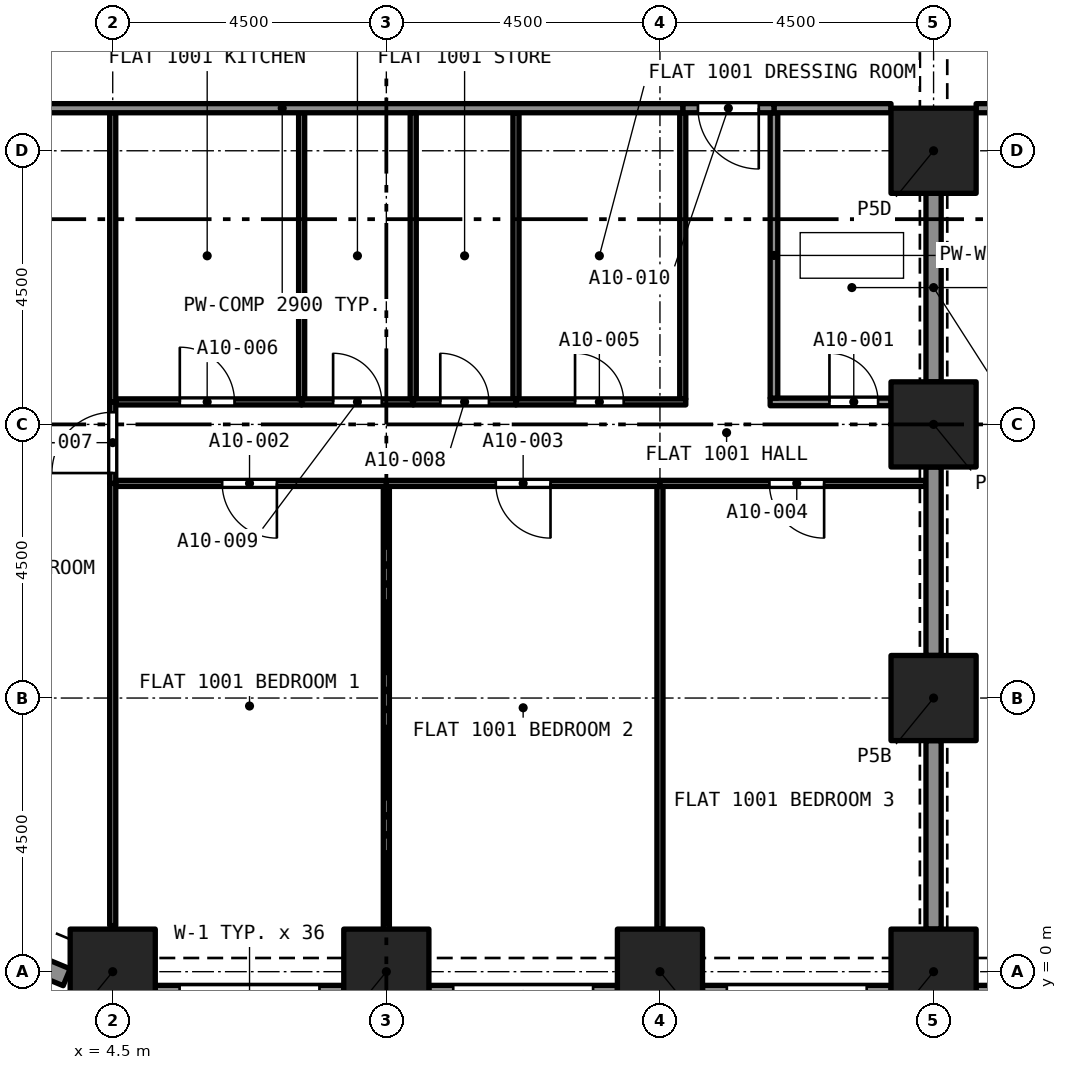
"""IFC4 building model, lengths in metres.
Left out: names, types, materials, properties, quantities, classifications, styles, units other than length and angle.
Written with IfcOpenShell. Run it as: python <this file> out.ifc"""

import sys

from ifc_helpers import new_model, si_unit, direction, frame, frame_2d, origin, origin_2d, place, context, subcontext, project, spatial, rectangle, extrude, element, fill, save


model = new_model("IFC4")
c1 = context("Model", 3, precision=1e-05, world=origin(), true_north=direction((0.0, 1.0)))
c2 = subcontext(c1, "Body", "Model", "MODEL_VIEW")
j1 = project(units=[si_unit("LENGTHUNIT", "METRE"), si_unit("PLANEANGLEUNIT", "RADIAN")], contexts=[c1])
p1 = place(None, origin())
s1 = spatial("IfcSite", under=j1, at=p1, CompositionType="ELEMENT")
p2 = place(p1, origin())
s2 = spatial("IfcBuilding", under=s1, at=p2, CompositionType="ELEMENT")
p3 = place(p2, frame((0.0, 0.0, 43.2)))
s3 = spatial("IfcBuildingStorey", under=s2, at=p3, CompositionType="ELEMENT", Elevation=43.2)
for number, where, z_axis, x_axis in (
    (1, (4.5, 0.0, 0.0), (0.0, 0.0, 1.0), (1.0, 0.0, 0.0)),
    (2, (9.0, 0.0, 0.0), (0.0, 0.0, 1.0), (1.0, 0.0, 0.0)),
    (3, (13.5, 0.0, 0.0), (0.0, 0.0, 1.0), (1.0, 0.0, 0.0)),
    (4, (18.0, 0.0, 0.0), (0.0, 0.0, 1.0), (1.0, 0.0, 0.0)),
    (5, (18.0, 4.5, 0.0), (0.0, 0.0, 1.0), (1.0, 0.0, 0.0)),
    (6, (18.0, 9.0, 0.0), (0.0, 0.0, 1.0), (1.0, 0.0, 0.0)),
    (7, (18.0, 13.5, 0.0), (0.0, 0.0, 1.0), (1.0, 0.0, 0.0)),
):
    element("IfcColumn", number, at=place(p3, frame(where, z_axis=z_axis, x_axis=x_axis)), inside=s3, PredefinedType="COLUMN", context=c2, shape_type="SweptSolid", body=[
        extrude(rectangle(XDim=1.4, YDim=1.4, at=origin_2d()), origin(), (0.0, 0.0, 1.0), 3.2),
    ])
p4 = place(p3, frame((3.743, -0.092, 0.0), z_axis=(0.0, 0.0, 1.0), x_axis=(-0.923857286003, 0.382737135771, 0.0)))
e8 = element("IfcWall", 8, at=p4, inside=s3, PredefinedType="SOLIDWALL", context=c2, shape_type="SweptSolid", body=[
    extrude(rectangle(XDim=1.865, YDim=0.3, at=frame_2d((0.933, 0.0))), origin(), (0.0, 0.0, 1.0), 3.2),
])
p5 = place(p4, frame((0.508, 0.0, 0.45)))
e9 = element("IfcOpeningElement", 9, at=p5, cuts=e8, PredefinedType="OPENING", context=c2, shape_type="SweptSolid", body=[
    extrude(rectangle(XDim=1.1, YDim=1.95, at=frame_2d((0.55, 0.975))), frame((0.0, 0.16, 0.0), z_axis=(0.0, -1.0, 0.0), x_axis=(1.0, 0.0, 0.0)), (0.0, 0.0, 1.0), 0.32),
])
p6 = place(p3, frame((8.3, -0.375, 0.0), z_axis=(0.0, 0.0, 1.0), x_axis=(-1.0, 0.0, 0.0)))
e10 = element("IfcWall", 10, at=p6, inside=s3, PredefinedType="SOLIDWALL", context=c2, shape_type="SweptSolid", body=[
    extrude(rectangle(XDim=3.1, YDim=0.3, at=frame_2d((1.55, 0.0))), origin(), (0.0, 0.0, 1.0), 3.2),
])
p7 = place(p6, frame((0.4, 0.0, 0.45)))
e11 = element("IfcOpeningElement", 11, at=p7, cuts=e10, PredefinedType="OPENING", context=c2, shape_type="SweptSolid", body=[
    extrude(rectangle(XDim=2.3, YDim=1.95, at=frame_2d((1.15, 0.975))), frame((0.0, 0.16, 0.0), z_axis=(0.0, -1.0, 0.0), x_axis=(1.0, 0.0, 0.0)), (0.0, 0.0, 1.0), 0.32),
])
p8 = place(p3, frame((12.8, -0.375, 0.0), z_axis=(0.0, 0.0, 1.0), x_axis=(-1.0, 0.0, 0.0)))
e12 = element("IfcWall", 12, at=p8, inside=s3, PredefinedType="SOLIDWALL", context=c2, shape_type="SweptSolid", body=[
    extrude(rectangle(XDim=3.1, YDim=0.3, at=frame_2d((1.55, 0.0))), origin(), (0.0, 0.0, 1.0), 3.2),
])
p9 = place(p8, frame((0.4, 0.0, 0.45)))
e13 = element("IfcOpeningElement", 13, at=p9, cuts=e12, PredefinedType="OPENING", context=c2, shape_type="SweptSolid", body=[
    extrude(rectangle(XDim=2.3, YDim=1.95, at=frame_2d((1.15, 0.975))), frame((0.0, 0.16, 0.0), z_axis=(0.0, -1.0, 0.0), x_axis=(1.0, 0.0, 0.0)), (0.0, 0.0, 1.0), 0.32),
])
p10 = place(p3, frame((17.3, -0.375, 0.0), z_axis=(0.0, 0.0, 1.0), x_axis=(-1.0, 0.0, 0.0)))
e14 = element("IfcWall", 14, at=p10, inside=s3, PredefinedType="SOLIDWALL", context=c2, shape_type="SweptSolid", body=[
    extrude(rectangle(XDim=3.1, YDim=0.3, at=frame_2d((1.55, 0.0))), origin(), (0.0, 0.0, 1.0), 3.2),
])
p11 = place(p10, frame((0.4, 0.0, 0.45)))
e15 = element("IfcOpeningElement", 15, at=p11, cuts=e14, PredefinedType="OPENING", context=c2, shape_type="SweptSolid", body=[
    extrude(rectangle(XDim=2.3, YDim=1.95, at=frame_2d((1.15, 0.975))), frame((0.0, 0.16, 0.0), z_axis=(0.0, -1.0, 0.0), x_axis=(1.0, 0.0, 0.0)), (0.0, 0.0, 1.0), 0.32),
])
p12 = place(p3, frame((21.8, -0.375, 0.0), z_axis=(0.0, 0.0, 1.0), x_axis=(-1.0, 0.0, 0.0)))
e16 = element("IfcWall", 16, at=p12, inside=s3, PredefinedType="SOLIDWALL", context=c2, shape_type="SweptSolid", body=[
    extrude(rectangle(XDim=3.1, YDim=0.3, at=frame_2d((1.55, 0.0))), origin(), (0.0, 0.0, 1.0), 3.2),
])
p13 = place(p12, frame((0.4, 0.0, 0.45)))
e17 = element("IfcOpeningElement", 17, at=p13, cuts=e16, PredefinedType="OPENING", context=c2, shape_type="SweptSolid", body=[
    extrude(rectangle(XDim=2.3, YDim=1.95, at=frame_2d((1.15, 0.975))), frame((0.0, 0.16, 0.0), z_axis=(0.0, -1.0, 0.0), x_axis=(1.0, 0.0, 0.0)), (0.0, 0.0, 1.0), 0.32),
])
p14 = place(p3, frame((15.312, 9.37, 0.0), z_axis=(0.0, 0.0, 1.0), x_axis=(1.0, 0.0, 0.0)))
e18 = element("IfcWall", 18, at=p14, inside=s3, PredefinedType="PARTITIONING", context=c2, shape_type="SweptSolid", body=[
    extrude(rectangle(XDim=1.988, YDim=0.125, at=frame_2d((0.994, 0.0))), origin(), (0.0, 0.0, 1.0), 2.9),
])
p15 = place(p14, frame((0.975, 0.0, 0.0)))
e19 = element("IfcOpeningElement", 19, at=p15, cuts=e18, PredefinedType="OPENING", context=c2, shape_type="SweptSolid", body=[
    extrude(rectangle(XDim=0.8, YDim=2.1, at=frame_2d((0.4, 1.05))), frame((0.0, 0.073, 0.0), z_axis=(0.0, -1.0, 0.0), x_axis=(1.0, 0.0, 0.0)), (0.0, 0.0, 1.0), 0.145),
])
p16 = place(p3, frame((15.375, 9.433, 0.0), z_axis=(0.0, 0.0, 1.0), x_axis=(0.0, 1.0, 0.0)))
e20 = element("IfcWall", 20, at=p16, inside=s3, PredefinedType="PARTITIONING", context=c2, shape_type="SweptSolid", body=[
    extrude(rectangle(XDim=4.692, YDim=0.125, at=frame_2d((2.346, 0.0))), origin(), (0.0, 0.0, 1.0), 2.9),
])
p17 = place(p3, frame((18.0, 9.7, 0.0), z_axis=(0.0, 0.0, 1.0), x_axis=(0.0, 1.0, 0.0)))
e21 = element("IfcWall", 21, at=p17, inside=s3, PredefinedType="PARTITIONING", context=c2, shape_type="SweptSolid", body=[
    extrude(rectangle(XDim=3.1, YDim=0.25, at=frame_2d((1.55, 0.0))), origin(), (0.0, 0.0, 1.0), 2.38),
])
p18 = place(p3, frame((15.375, 14.2, 0.0), z_axis=(0.0, 0.0, 1.0), x_axis=(1.0, 0.0, 0.0)))
e22 = element("IfcWall", 22, at=p18, inside=s3, PredefinedType="PARTITIONING", context=c2, shape_type="SweptSolid", body=[
    extrude(rectangle(XDim=1.925, YDim=0.15, at=frame_2d((0.962, 0.0))), origin(), (0.0, 0.0, 1.0), 2.9),
])
p19 = place(p3, frame((9.0, 0.7, 0.0), z_axis=(0.0, 0.0, 1.0), x_axis=(0.0, 1.0, 0.0)))
e23 = element("IfcWall", 23, at=p19, inside=s3, PredefinedType="PARTITIONING", context=c2, shape_type="SweptSolid", body=[
    extrude(rectangle(XDim=7.28, YDim=0.1, at=frame_2d((3.64, 0.0))), origin(), (0.0, 0.0, 1.0), 2.9),
])
p20 = place(p3, frame((9.0, 8.03, 0.0), z_axis=(0.0, 0.0, 1.0), x_axis=(-1.0, 0.0, 0.0)))
e24 = element("IfcWall", 24, at=p20, inside=s3, PredefinedType="PARTITIONING", context=c2, shape_type="SweptSolid", body=[
    extrude(rectangle(XDim=4.45, YDim=0.1, at=frame_2d((2.225, 0.0))), origin(), (0.0, 0.0, 1.0), 2.9),
])
p21 = place(p20, frame((1.8, 0.0, 0.0)))
e25 = element("IfcOpeningElement", 25, at=p21, cuts=e24, PredefinedType="OPENING", context=c2, shape_type="SweptSolid", body=[
    extrude(rectangle(XDim=0.9, YDim=2.1, at=frame_2d((0.45, 1.05))), frame((0.0, 0.06, 0.0), z_axis=(0.0, -1.0, 0.0), x_axis=(1.0, 0.0, 0.0)), (0.0, 0.0, 1.0), 0.12),
])
p22 = place(p3, frame((4.5, 0.758, 0.0), z_axis=(0.0, 0.0, 1.0), x_axis=(0.0, 1.0, 0.0)))
e26 = element("IfcWall", 26, at=p22, inside=s3, PredefinedType="PARTITIONING", context=c2, shape_type="SweptSolid", body=[
    extrude(rectangle(XDim=7.272, YDim=0.1, at=frame_2d((3.636, 0.0))), origin(), (0.0, 0.0, 1.0), 2.9),
])
p23 = place(p3, frame((13.5, 0.7, 0.0), z_axis=(0.0, 0.0, 1.0), x_axis=(0.0, 1.0, 0.0)))
e27 = element("IfcWall", 27, at=p23, inside=s3, PredefinedType="PARTITIONING", context=c2, shape_type="SweptSolid", body=[
    extrude(rectangle(XDim=7.28, YDim=0.1, at=frame_2d((3.64, 0.0))), origin(), (0.0, 0.0, 1.0), 2.9),
])
p24 = place(p3, frame((13.5, 8.03, 0.0), z_axis=(0.0, 0.0, 1.0), x_axis=(-1.0, 0.0, 0.0)))
e28 = element("IfcWall", 28, at=p24, inside=s3, PredefinedType="PARTITIONING", context=c2, shape_type="SweptSolid", body=[
    extrude(rectangle(XDim=4.5, YDim=0.1, at=frame_2d((2.25, 0.0))), origin(), (0.0, 0.0, 1.0), 2.9),
])
p25 = place(p24, frame((1.8, 0.0, 0.0)))
e29 = element("IfcOpeningElement", 29, at=p25, cuts=e28, PredefinedType="OPENING", context=c2, shape_type="SweptSolid", body=[
    extrude(rectangle(XDim=0.9, YDim=2.1, at=frame_2d((0.45, 1.05))), frame((0.0, 0.06, 0.0), z_axis=(0.0, -1.0, 0.0), x_axis=(1.0, 0.0, 0.0)), (0.0, 0.0, 1.0), 0.12),
])
p26 = place(p3, frame((17.875, 8.03, 0.0), z_axis=(0.0, 0.0, 1.0), x_axis=(-1.0, 0.0, 0.0)))
e30 = element("IfcWall", 30, at=p26, inside=s3, PredefinedType="PARTITIONING", context=c2, shape_type="SweptSolid", body=[
    extrude(rectangle(XDim=4.375, YDim=0.1, at=frame_2d((2.188, 0.0))), origin(), (0.0, 0.0, 1.0), 2.9),
])
p27 = place(p26, frame((1.675, 0.0, 0.0)))
e31 = element("IfcOpeningElement", 31, at=p27, cuts=e30, PredefinedType="OPENING", context=c2, shape_type="SweptSolid", body=[
    extrude(rectangle(XDim=0.9, YDim=2.1, at=frame_2d((0.45, 1.05))), frame((0.0, 0.06, 0.0), z_axis=(0.0, -1.0, 0.0), x_axis=(1.0, 0.0, 0.0)), (0.0, 0.0, 1.0), 0.12),
])
for number, where, z_axis, x_axis in (
    (32, (18.0, 5.2, 0.0), (0.0, 0.0, 1.0), (0.0, 1.0, 0.0)),
    (33, (18.0, 0.7, 0.0), (0.0, 0.0, 1.0), (0.0, 1.0, 0.0)),
):
    element("IfcWall", number, at=place(p3, frame(where, z_axis=z_axis, x_axis=x_axis)), inside=s3, PredefinedType="PARTITIONING", context=c2, shape_type="SweptSolid", body=[
        extrude(rectangle(XDim=3.1, YDim=0.25, at=frame_2d((1.55, 0.0))), origin(), (0.0, 0.0, 1.0), 2.38),
    ])
p28 = place(p3, frame((13.875, 9.42, 0.0), z_axis=(0.0, 0.0, 1.0), x_axis=(0.0, 1.0, 0.0)))
e34 = element("IfcWall", 34, at=p28, inside=s3, PredefinedType="PARTITIONING", context=c2, shape_type="SweptSolid", body=[
    extrude(rectangle(XDim=4.705, YDim=0.1, at=frame_2d((2.353, 0.0))), origin(), (0.0, 0.0, 1.0), 2.9),
])
p29 = place(p3, frame((11.132, 9.37, 0.0), z_axis=(0.0, 0.0, 1.0), x_axis=(1.0, 0.0, 0.0)))
e35 = element("IfcWall", 35, at=p29, inside=s3, PredefinedType="PARTITIONING", context=c2, shape_type="SweptSolid", body=[
    extrude(rectangle(XDim=2.793, YDim=0.1, at=frame_2d((1.396, 0.0))), origin(), (0.0, 0.0, 1.0), 2.9),
])
p30 = place(p29, frame((0.972, 0.0, 0.0)))
e36 = element("IfcOpeningElement", 36, at=p30, cuts=e35, PredefinedType="OPENING", context=c2, shape_type="SweptSolid", body=[
    extrude(rectangle(XDim=0.8, YDim=2.1, at=frame_2d((0.4, 1.05))), frame((0.0, 0.06, 0.0), z_axis=(0.0, -1.0, 0.0), x_axis=(1.0, 0.0, 0.0)), (0.0, 0.0, 1.0), 0.12),
])
p31 = place(p3, frame((11.132, 9.42, 0.0), z_axis=(0.0, 0.0, 1.0), x_axis=(0.0, 1.0, 0.0)))
e37 = element("IfcWall", 37, at=p31, inside=s3, PredefinedType="PARTITIONING", context=c2, shape_type="SweptSolid", body=[
    extrude(rectangle(XDim=4.705, YDim=0.1, at=frame_2d((2.353, 0.0))), origin(), (0.0, 0.0, 1.0), 2.9),
])
p32 = place(p3, frame((4.55, 9.37, 0.0), z_axis=(0.0, 0.0, 1.0), x_axis=(1.0, 0.0, 0.0)))
e38 = element("IfcWall", 38, at=p32, inside=s3, PredefinedType="PARTITIONING", context=c2, shape_type="SweptSolid", body=[
    extrude(rectangle(XDim=3.057, YDim=0.1, at=frame_2d((1.528, 0.0))), origin(), (0.0, 0.0, 1.0), 2.9),
])
p33 = place(p32, frame((1.053, 0.0, 0.0)))
e39 = element("IfcOpeningElement", 39, at=p33, cuts=e38, PredefinedType="OPENING", context=c2, shape_type="SweptSolid", body=[
    extrude(rectangle(XDim=0.9, YDim=2.1, at=frame_2d((0.45, 1.05))), frame((0.0, 0.06, 0.0), z_axis=(0.0, -1.0, 0.0), x_axis=(1.0, 0.0, 0.0)), (0.0, 0.0, 1.0), 0.12),
])
p34 = place(p3, frame((4.5, 8.03, 0.0), z_axis=(0.0, 0.0, 1.0), x_axis=(0.0, 1.0, 0.0)))
e40 = element("IfcWall", 40, at=p34, inside=s3, PredefinedType="PARTITIONING", context=c2, shape_type="SweptSolid", body=[
    extrude(rectangle(XDim=1.34, YDim=0.1, at=frame_2d((0.67, 0.0))), origin(), (0.0, 0.0, 1.0), 2.9),
])
p35 = place(p34, frame((0.17, 0.0, 0.0)))
e41 = element("IfcOpeningElement", 41, at=p35, cuts=e40, PredefinedType="OPENING", context=c2, shape_type="SweptSolid", body=[
    extrude(rectangle(XDim=1.0, YDim=2.1, at=frame_2d((0.5, 1.05))), frame((0.0, 0.06, 0.0), z_axis=(0.0, -1.0, 0.0), x_axis=(1.0, 0.0, 0.0)), (0.0, 0.0, 1.0), 0.12),
])
p36 = place(p3, frame((9.442, 9.37, 0.0), z_axis=(0.0, 0.0, 1.0), x_axis=(1.0, 0.0, 0.0)))
e42 = element("IfcWall", 42, at=p36, inside=s3, PredefinedType="PARTITIONING", context=c2, shape_type="SweptSolid", body=[
    extrude(rectangle(XDim=1.689, YDim=0.1, at=frame_2d((0.845, 0.0))), origin(), (0.0, 0.0, 1.0), 2.9),
])
p37 = place(p36, frame((0.445, 0.0, 0.0)))
e43 = element("IfcOpeningElement", 43, at=p37, cuts=e42, PredefinedType="OPENING", context=c2, shape_type="SweptSolid", body=[
    extrude(rectangle(XDim=0.8, YDim=2.1, at=frame_2d((0.4, 1.05))), frame((0.0, 0.06, 0.0), z_axis=(0.0, -1.0, 0.0), x_axis=(1.0, 0.0, 0.0)), (0.0, 0.0, 1.0), 0.12),
])
p38 = place(p3, frame((7.607, 9.37, 0.0), z_axis=(0.0, 0.0, 1.0), x_axis=(1.0, 0.0, 0.0)))
e44 = element("IfcWall", 44, at=p38, inside=s3, PredefinedType="PARTITIONING", context=c2, shape_type="SweptSolid", body=[
    extrude(rectangle(XDim=1.836, YDim=0.1, at=frame_2d((0.918, 0.0))), origin(), (0.0, 0.0, 1.0), 2.9),
])
p39 = place(p38, frame((0.518, 0.0, 0.0)))
e45 = element("IfcOpeningElement", 45, at=p39, cuts=e44, PredefinedType="OPENING", context=c2, shape_type="SweptSolid", body=[
    extrude(rectangle(XDim=0.8, YDim=2.1, at=frame_2d((0.4, 1.05))), frame((0.0, 0.06, 0.0), z_axis=(0.0, -1.0, 0.0), x_axis=(1.0, 0.0, 0.0)), (0.0, 0.0, 1.0), 0.12),
])
p40 = place(p3, frame((15.375, 14.2, 0.0), z_axis=(0.0, 0.0, 1.0), x_axis=(-1.0, 0.0, 0.0)))
e46 = element("IfcWall", 46, at=p40, inside=s3, PredefinedType="PARTITIONING", context=c2, shape_type="SweptSolid", body=[
    extrude(rectangle(XDim=1.5, YDim=0.15, at=frame_2d((0.75, 0.0))), origin(), (0.0, 0.0, 1.0), 2.9),
])
p41 = place(p40, frame((0.25, 0.0, 0.0)))
e47 = element("IfcOpeningElement", 47, at=p41, cuts=e46, PredefinedType="OPENING", context=c2, shape_type="SweptSolid", body=[
    extrude(rectangle(XDim=1.0, YDim=2.1, at=frame_2d((0.5, 1.05))), frame((0.0, 0.085, 0.0), z_axis=(0.0, -1.0, 0.0), x_axis=(1.0, 0.0, 0.0)), (0.0, 0.0, 1.0), 0.17),
])
p42 = place(p3, frame((4.5, 9.37, 0.0), z_axis=(0.0, 0.0, 1.0), x_axis=(0.0, 1.0, 0.0)))
e48 = element("IfcWall", 48, at=p42, inside=s3, PredefinedType="PARTITIONING", context=c2, shape_type="SweptSolid", body=[
    extrude(rectangle(XDim=4.755, YDim=0.1, at=frame_2d((2.377, 0.0))), origin(), (0.0, 0.0, 1.0), 2.9),
])
p43 = place(p3, frame((7.607, 9.42, 0.0), z_axis=(0.0, 0.0, 1.0), x_axis=(0.0, 1.0, 0.0)))
e49 = element("IfcWall", 49, at=p43, inside=s3, PredefinedType="PARTITIONING", context=c2, shape_type="SweptSolid", body=[
    extrude(rectangle(XDim=4.705, YDim=0.1, at=frame_2d((2.353, 0.0))), origin(), (0.0, 0.0, 1.0), 2.9),
])
p44 = place(p3, frame((0.7, 14.2, 0.0), z_axis=(0.0, 0.0, 1.0), x_axis=(1.0, 0.0, 0.0)))
e50 = element("IfcWall", 50, at=p44, inside=s3, PredefinedType="PARTITIONING", context=c2, shape_type="SweptSolid", body=[
    extrude(rectangle(XDim=13.175, YDim=0.15, at=frame_2d((6.587, 0.0))), origin(), (0.0, 0.0, 1.0), 2.9),
])
p45 = place(p3, frame((9.442, 9.42, 0.0), z_axis=(0.0, 0.0, 1.0), x_axis=(0.0, 1.0, 0.0)))
e51 = element("IfcWall", 51, at=p45, inside=s3, PredefinedType="PARTITIONING", context=c2, shape_type="SweptSolid", body=[
    extrude(rectangle(XDim=4.705, YDim=0.1, at=frame_2d((2.353, 0.0))), origin(), (0.0, 0.0, 1.0), 2.9),
])
p46 = place(p3, frame((27.0, 14.2, 0.0), z_axis=(0.0, 0.0, 1.0), x_axis=(-1.0, 0.0, 0.0)))
e52 = element("IfcWall", 52, at=p46, inside=s3, PredefinedType="PARTITIONING", context=c2, shape_type="SweptSolid", body=[
    extrude(rectangle(XDim=8.3, YDim=0.15, at=frame_2d((4.15, 0.0))), origin(), (0.0, 0.0, 1.0), 2.75),
])
p47 = place(p46, frame((4.0, 0.0, 0.0)))
e53 = element("IfcOpeningElement", 53, at=p47, cuts=e52, PredefinedType="OPENING", context=c2, shape_type="SweptSolid", body=[
    extrude(rectangle(XDim=1.0, YDim=2.1, at=frame_2d((0.5, 1.05))), frame((0.0, 0.085, 0.0), z_axis=(0.0, -1.0, 0.0), x_axis=(1.0, 0.0, 0.0)), (0.0, 0.0, 1.0), 0.17),
])
p48 = place(p15, origin())
e54 = element("IfcDoor", 54, at=p48, inside=s3, OperationType="SINGLE_SWING_RIGHT", PredefinedType="DOOR", context=c2, shape_type="SweptSolid", body=[
    extrude(rectangle(XDim=0.8, YDim=2.1, at=frame_2d((0.4, 1.05))), frame((0.0, 0.025, 0.0), z_axis=(0.0, -1.0, 0.0), x_axis=(1.0, 0.0, 0.0)), (0.0, 0.0, 1.0), 0.05),
])
fill(e19, e54)
p49 = place(p21, origin())
e55 = element("IfcDoor", 55, at=p49, inside=s3, OperationType="SINGLE_SWING_RIGHT", PredefinedType="DOOR", context=c2, shape_type="SweptSolid", body=[
    extrude(rectangle(XDim=0.9, YDim=2.1, at=frame_2d((0.45, 1.05))), frame((0.0, 0.025, 0.0), z_axis=(0.0, -1.0, 0.0), x_axis=(1.0, 0.0, 0.0)), (0.0, 0.0, 1.0), 0.05),
])
fill(e25, e55)
p50 = place(p25, origin())
e56 = element("IfcDoor", 56, at=p50, inside=s3, OperationType="SINGLE_SWING_LEFT", PredefinedType="DOOR", context=c2, shape_type="SweptSolid", body=[
    extrude(rectangle(XDim=0.9, YDim=2.1, at=frame_2d((0.45, 1.05))), frame((0.0, 0.025, 0.0), z_axis=(0.0, -1.0, 0.0), x_axis=(1.0, 0.0, 0.0)), (0.0, 0.0, 1.0), 0.05),
])
fill(e29, e56)
p51 = place(p27, origin())
e57 = element("IfcDoor", 57, at=p51, inside=s3, OperationType="SINGLE_SWING_LEFT", PredefinedType="DOOR", context=c2, shape_type="SweptSolid", body=[
    extrude(rectangle(XDim=0.9, YDim=2.1, at=frame_2d((0.45, 1.05))), frame((0.0, 0.025, 0.0), z_axis=(0.0, -1.0, 0.0), x_axis=(1.0, 0.0, 0.0)), (0.0, 0.0, 1.0), 0.05),
])
fill(e31, e57)
p52 = place(p30, origin())
e58 = element("IfcDoor", 58, at=p52, inside=s3, OperationType="SINGLE_SWING_LEFT", PredefinedType="DOOR", context=c2, shape_type="SweptSolid", body=[
    extrude(rectangle(XDim=0.8, YDim=2.1, at=frame_2d((0.4, 1.05))), frame((0.0, 0.025, 0.0), z_axis=(0.0, -1.0, 0.0), x_axis=(1.0, 0.0, 0.0)), (0.0, 0.0, 1.0), 0.05),
])
fill(e36, e58)
p53 = place(p33, origin())
e59 = element("IfcDoor", 59, at=p53, inside=s3, OperationType="SINGLE_SWING_LEFT", PredefinedType="DOOR", context=c2, shape_type="SweptSolid", body=[
    extrude(rectangle(XDim=0.9, YDim=2.1, at=frame_2d((0.45, 1.05))), frame((0.0, 0.025, 0.0), z_axis=(0.0, -1.0, 0.0), x_axis=(1.0, 0.0, 0.0)), (0.0, 0.0, 1.0), 0.05),
])
fill(e39, e59)
p54 = place(p35, origin())
e60 = element("IfcDoor", 60, at=p54, inside=s3, OperationType="SINGLE_SWING_RIGHT", PredefinedType="DOOR", context=c2, shape_type="SweptSolid", body=[
    extrude(rectangle(XDim=1.0, YDim=2.1, at=frame_2d((0.5, 1.05))), frame((0.0, 0.025, 0.0), z_axis=(0.0, -1.0, 0.0), x_axis=(1.0, 0.0, 0.0)), (0.0, 0.0, 1.0), 0.05),
])
fill(e41, e60)
p55 = place(p37, origin())
e61 = element("IfcDoor", 61, at=p55, inside=s3, OperationType="SINGLE_SWING_LEFT", PredefinedType="DOOR", context=c2, shape_type="SweptSolid", body=[
    extrude(rectangle(XDim=0.8, YDim=2.1, at=frame_2d((0.4, 1.05))), frame((0.0, 0.025, 0.0), z_axis=(0.0, -1.0, 0.0), x_axis=(1.0, 0.0, 0.0)), (0.0, 0.0, 1.0), 0.05),
])
fill(e43, e61)
p56 = place(p39, origin())
e62 = element("IfcDoor", 62, at=p56, inside=s3, OperationType="SINGLE_SWING_RIGHT", PredefinedType="DOOR", context=c2, shape_type="SweptSolid", body=[
    extrude(rectangle(XDim=0.8, YDim=2.1, at=frame_2d((0.4, 1.05))), frame((0.0, 0.025, 0.0), z_axis=(0.0, -1.0, 0.0), x_axis=(1.0, 0.0, 0.0)), (0.0, 0.0, 1.0), 0.05),
])
fill(e45, e62)
p57 = place(p41, origin())
e63 = element("IfcDoor", 63, at=p57, inside=s3, OperationType="SINGLE_SWING_RIGHT", PredefinedType="DOOR", context=c2, shape_type="SweptSolid", body=[
    extrude(rectangle(XDim=1.0, YDim=2.1, at=frame_2d((0.5, 1.05))), frame((0.0, 0.025, 0.0), z_axis=(0.0, -1.0, 0.0), x_axis=(1.0, 0.0, 0.0)), (0.0, 0.0, 1.0), 0.05),
])
fill(e47, e63)
save(model, sys.argv[1])
